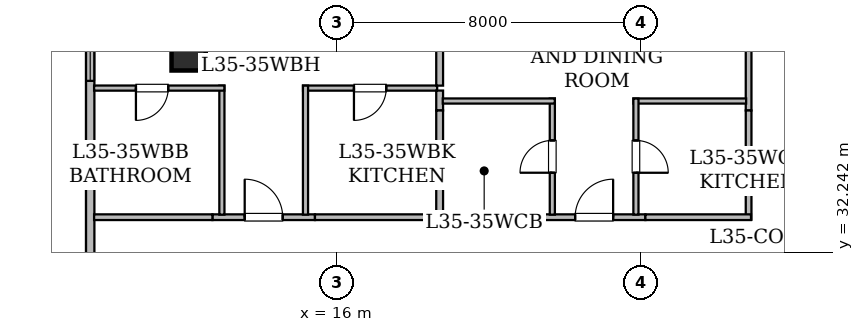
"""IFC4 building model, lengths in metres.
Left out: names, types, materials, properties, quantities, classifications, styles, units other than length and angle.
Written with IfcOpenShell. Run it as: python <this file> out.ifc"""

import sys

from ifc_helpers import new_model, si_unit, direction, frame, frame_2d, origin, origin_2d, place, context, subcontext, project, spatial, rectangle, hollow_rectangle, extrude, element, fill, save


model = new_model("IFC4")
c1 = context("Model", 3, precision=1e-05, world=origin(), true_north=direction((0.0, 1.0)))
c2 = subcontext(c1, "Body", "Model", "MODEL_VIEW")
j1 = project(units=[si_unit("LENGTHUNIT", "METRE"), si_unit("PLANEANGLEUNIT", "RADIAN")], contexts=[c1])
p1 = place(None, origin())
s1 = spatial("IfcSite", under=j1, at=p1, CompositionType="ELEMENT")
p2 = place(p1, origin())
s2 = spatial("IfcBuilding", under=s1, at=p2, CompositionType="ELEMENT")
p3 = place(p2, frame((0.0, 0.0, 138.4)))
s3 = spatial("IfcBuildingStorey", under=s2, at=p3, CompositionType="ELEMENT", Elevation=138.4)
p4 = place(p3, frame((12.1, 37.475, 0.0), z_axis=(0.0, 0.0, 1.0), x_axis=(1.0, 0.0, 0.0)))
e1 = element("IfcColumn", 1, at=p4, inside=s3, PredefinedType="COLUMN", context=c2, shape_type="SweptSolid", body=[
    extrude(hollow_rectangle(XDim=0.9, YDim=0.9, WallThickness=0.045, at=origin_2d()), origin(), (0.0, 0.0, 1.0), 3.65),
])
p5 = place(p3, frame((9.51, 31.293, 0.0), z_axis=(0.0, 0.0, 1.0), x_axis=(0.0, 1.0, 0.0)))
e2 = element("IfcWall", 2, at=p5, inside=s3, PredefinedType="STANDARD", context=c2, shape_type="SweptSolid", body=[
    extrude(rectangle(XDim=14.061, YDim=0.22, at=frame_2d((7.031, 0.0))), origin(), (0.0, 0.0, 1.0), 3.43),
])
p6 = place(p5, frame((5.459, 0.0, 0.8)))
e3 = element("IfcOpeningElement", 3, at=p6, cuts=e2, PredefinedType="OPENING", context=c2, shape_type="SweptSolid", body=[
    extrude(rectangle(XDim=1.2, YDim=1.5, at=frame_2d((0.6, 0.75))), frame((0.0, 0.12, 0.0), z_axis=(0.0, -1.0, 0.0), x_axis=(1.0, 0.0, 0.0)), (0.0, 0.0, 1.0), 0.24),
])
p7 = place(p5, frame((9.237, 0.0, 0.85)))
e4 = element("IfcOpeningElement", 4, at=p7, cuts=e2, PredefinedType="OPENING", context=c2, shape_type="SweptSolid", body=[
    extrude(rectangle(XDim=1.65, YDim=1.55, at=frame_2d((0.825, 0.775))), frame((0.0, 0.12, 0.0), z_axis=(0.0, -1.0, 0.0), x_axis=(1.0, 0.0, 0.0)), (0.0, 0.0, 1.0), 0.24),
])
p8 = place(p3, frame((12.726, 33.165, 0.0), z_axis=(0.0, 0.0, 1.0), x_axis=(1.0, 0.0, 0.0)))
e5 = element("IfcWall", 5, at=p8, inside=s3, PredefinedType="STANDARD", context=c2, shape_type="SweptSolid", body=[
    extrude(rectangle(XDim=2.698, YDim=0.15, at=frame_2d((1.349, 0.0))), origin(), (0.0, 0.0, 1.0), 3.43),
])
p9 = place(p8, frame((0.849, 0.0, 0.0)))
e6 = element("IfcOpeningElement", 6, at=p9, cuts=e5, PredefinedType="OPENING", context=c2, shape_type="SweptSolid", body=[
    extrude(rectangle(XDim=1.0, YDim=2.15, at=frame_2d((0.5, 1.075))), frame((0.0, 0.085, 0.0), z_axis=(0.0, -1.0, 0.0), x_axis=(1.0, 0.0, 0.0)), (0.0, 0.0, 1.0), 0.17),
])
p10 = place(p3, frame((9.612, 33.165, 0.0), z_axis=(0.0, 0.0, 1.0), x_axis=(1.0, 0.0, 0.0)))
e7 = element("IfcWall", 7, at=p10, inside=s3, PredefinedType="STANDARD", context=c2, shape_type="SweptSolid", body=[
    extrude(rectangle(XDim=3.114, YDim=0.15, at=frame_2d((1.557, 0.0))), origin(), (0.0, 0.0, 1.0), 2.876),
])
p11 = place(p3, frame((15.424, 33.165, 0.0), z_axis=(0.0, 0.0, 1.0), x_axis=(1.0, 0.0, 0.0)))
e8 = element("IfcWall", 8, at=p11, inside=s3, PredefinedType="STANDARD", context=c2, shape_type="SweptSolid", body=[
    extrude(rectangle(XDim=3.53, YDim=0.15, at=frame_2d((1.765, 0.0))), origin(), (0.0, 0.0, 1.0), 2.647),
])
p12 = place(p3, frame((26.835, 35.973, 0.0), z_axis=(0.0, 0.0, 1.0), x_axis=(0.0, 1.0, 0.0)))
e9 = element("IfcWall", 9, at=p12, inside=s3, PredefinedType="STANDARD", context=c2, shape_type="SweptSolid", body=[
    extrude(rectangle(XDim=2.078, YDim=0.15, at=frame_2d((1.039, 0.0))), origin(), (0.0, 0.0, 1.0), 2.647),
])
p13 = place(p3, frame((21.421, 33.165, 0.0), z_axis=(0.0, 0.0, 1.0), x_axis=(1.0, 0.0, 0.0)))
e10 = element("IfcWall", 10, at=p13, inside=s3, PredefinedType="STANDARD", context=c2, shape_type="SweptSolid", body=[
    extrude(rectangle(XDim=2.698, YDim=0.15, at=frame_2d((1.349, 0.0))), origin(), (0.0, 0.0, 1.0), 3.43),
])
p14 = place(p13, frame((0.849, 0.0, 0.0)))
e11 = element("IfcOpeningElement", 11, at=p14, cuts=e10, PredefinedType="OPENING", context=c2, shape_type="SweptSolid", body=[
    extrude(rectangle(XDim=1.0, YDim=2.15, at=frame_2d((0.5, 1.075))), frame((0.0, 0.085, 0.0), z_axis=(0.0, -1.0, 0.0), x_axis=(1.0, 0.0, 0.0)), (0.0, 0.0, 1.0), 0.17),
])
p15 = place(p3, frame((18.954, 33.165, 0.0), z_axis=(0.0, 0.0, 1.0), x_axis=(1.0, 0.0, 0.0)))
e12 = element("IfcWall", 12, at=p15, inside=s3, PredefinedType="STANDARD", context=c2, shape_type="SweptSolid", body=[
    extrude(rectangle(XDim=2.467, YDim=0.15, at=frame_2d((1.233, 0.0))), origin(), (0.0, 0.0, 1.0), 3.43),
])
p16 = place(p3, frame((26.835, 33.1, 0.0), z_axis=(0.0, 0.0, 1.0), x_axis=(0.0, 1.0, 0.0)))
e13 = element("IfcWall", 13, at=p16, inside=s3, PredefinedType="STANDARD", context=c2, shape_type="SweptSolid", body=[
    extrude(rectangle(XDim=2.873, YDim=0.15, at=frame_2d((1.437, 0.0))), origin(), (0.0, 0.0, 1.0), 3.43),
])
p17 = place(p3, frame((24.119, 33.165, 0.0), z_axis=(0.0, 0.0, 1.0), x_axis=(1.0, 0.0, 0.0)))
e14 = element("IfcWall", 14, at=p17, inside=s3, PredefinedType="STANDARD", context=c2, shape_type="SweptSolid", body=[
    extrude(rectangle(XDim=2.779, YDim=0.15, at=frame_2d((1.39, 0.0))), origin(), (0.0, 0.0, 1.0), 3.43),
])
p18 = place(p3, frame((12.975, 33.232, 0.0), z_axis=(0.0, 0.0, 1.0), x_axis=(0.0, 1.0, 0.0)))
e15 = element("IfcWall", 15, at=p18, inside=s3, PredefinedType="PARTITIONING", context=c2, shape_type="SweptSolid", body=[
    extrude(rectangle(XDim=3.395, YDim=0.135, at=frame_2d((1.698, 0.0))), origin(), (0.0, 0.0, 1.0), 3.43),
])
p19 = place(p3, frame((13.04, 36.562, 0.0), z_axis=(0.0, 0.0, 1.0), x_axis=(-1.0, 0.0, 0.0)))
e16 = element("IfcWall", 16, at=p19, inside=s3, PredefinedType="PARTITIONING", context=c2, shape_type="SweptSolid", body=[
    extrude(rectangle(XDim=3.428, YDim=0.135, at=frame_2d((1.714, 0.0))), origin(), (0.0, 0.0, 1.0), 2.876),
])
p20 = place(p19, frame((1.477, 0.0, 0.0)))
e17 = element("IfcOpeningElement", 17, at=p20, cuts=e16, PredefinedType="OPENING", context=c2, shape_type="SweptSolid", body=[
    extrude(rectangle(XDim=0.85, YDim=2.1, at=frame_2d((0.425, 1.05))), frame((0.0, 0.077, 0.0), z_axis=(0.0, -1.0, 0.0), x_axis=(1.0, 0.0, 0.0)), (0.0, 0.0, 1.0), 0.155),
])
p21 = place(p3, frame((18.64, 36.562, 0.0), z_axis=(0.0, 0.0, 1.0), x_axis=(-1.0, 0.0, 0.0)))
e18 = element("IfcWall", 18, at=p21, inside=s3, PredefinedType="PARTITIONING", context=c2, shape_type="SweptSolid", body=[
    extrude(rectangle(XDim=3.53, YDim=0.135, at=frame_2d((1.765, 0.0))), origin(), (0.0, 0.0, 1.0), 2.647),
])
p22 = place(p21, frame((1.34, 0.0, 0.0)))
e19 = element("IfcOpeningElement", 19, at=p22, cuts=e18, PredefinedType="OPENING", context=c2, shape_type="SweptSolid", body=[
    extrude(rectangle(XDim=0.85, YDim=2.1, at=frame_2d((0.425, 1.05))), frame((0.0, 0.077, 0.0), z_axis=(0.0, -1.0, 0.0), x_axis=(1.0, 0.0, 0.0)), (0.0, 0.0, 1.0), 0.155),
])
p23 = place(p3, frame((15.175, 36.627, 0.0), z_axis=(0.0, 0.0, 1.0), x_axis=(0.0, -1.0, 0.0)))
e20 = element("IfcWall", 20, at=p23, inside=s3, PredefinedType="PARTITIONING", context=c2, shape_type="SweptSolid", body=[
    extrude(rectangle(XDim=3.395, YDim=0.135, at=frame_2d((1.698, 0.0))), origin(), (0.0, 0.0, 1.0), 3.43),
])
p24 = place(p3, frame((18.705, 38.051, 0.0), z_axis=(0.0, 0.0, 1.0), x_axis=(0.0, -1.0, 0.0)))
e21 = element("IfcWall", 21, at=p24, inside=s3, PredefinedType="STANDARD", context=c2, shape_type="SweptSolid", body=[
    extrude(rectangle(XDim=1.424, YDim=0.18, at=frame_2d((0.712, 0.0))), origin(), (0.0, 0.0, 1.0), 2.647),
])
p25 = place(p3, frame((18.705, 36.497, 0.0), z_axis=(0.0, 0.0, 1.0), x_axis=(0.0, -1.0, 0.0)))
e22 = element("IfcWall", 22, at=p25, inside=s3, PredefinedType="STANDARD", context=c2, shape_type="SweptSolid", body=[
    extrude(rectangle(XDim=0.524, YDim=0.18, at=frame_2d((0.262, 0.0))), origin(), (0.0, 0.0, 1.0), 3.43),
])
p26 = place(p3, frame((18.705, 35.973, 0.0), z_axis=(0.0, 0.0, 1.0), x_axis=(0.0, -1.0, 0.0)))
e23 = element("IfcWall", 23, at=p26, inside=s3, PredefinedType="STANDARD", context=c2, shape_type="SweptSolid", body=[
    extrude(rectangle(XDim=2.741, YDim=0.18, at=frame_2d((1.371, 0.0))), origin(), (0.0, 0.0, 1.0), 3.43),
])
p27 = place(p3, frame((21.67, 33.232, 0.0), z_axis=(0.0, 0.0, 1.0), x_axis=(0.0, 1.0, 0.0)))
e24 = element("IfcWall", 24, at=p27, inside=s3, PredefinedType="PARTITIONING", context=c2, shape_type="SweptSolid", body=[
    extrude(rectangle(XDim=3.055, YDim=0.135, at=frame_2d((1.528, 0.0))), origin(), (0.0, 0.0, 1.0), 3.43),
])
p28 = place(p27, frame((1.103, 0.0, 0.0)))
e25 = element("IfcOpeningElement", 25, at=p28, cuts=e24, PredefinedType="OPENING", context=c2, shape_type="SweptSolid", body=[
    extrude(rectangle(XDim=0.85, YDim=2.1, at=frame_2d((0.425, 1.05))), frame((0.0, 0.077, 0.0), z_axis=(0.0, -1.0, 0.0), x_axis=(1.0, 0.0, 0.0)), (0.0, 0.0, 1.0), 0.155),
])
p29 = place(p3, frame((21.735, 36.222, 0.0), z_axis=(0.0, 0.0, 1.0), x_axis=(-1.0, 0.0, 0.0)))
e26 = element("IfcWall", 26, at=p29, inside=s3, PredefinedType="PARTITIONING", context=c2, shape_type="SweptSolid", body=[
    extrude(rectangle(XDim=2.948, YDim=0.135, at=frame_2d((1.474, 0.0))), origin(), (0.0, 0.0, 1.0), 3.43),
])
p30 = place(p3, frame((26.77, 36.222, 0.0), z_axis=(0.0, 0.0, 1.0), x_axis=(-1.0, 0.0, 0.0)))
e27 = element("IfcWall", 27, at=p30, inside=s3, PredefinedType="PARTITIONING", context=c2, shape_type="SweptSolid", body=[
    extrude(rectangle(XDim=2.965, YDim=0.135, at=frame_2d((1.482, 0.0))), origin(), (0.0, 0.0, 1.0), 3.43),
])
p31 = place(p3, frame((23.87, 36.287, 0.0), z_axis=(0.0, 0.0, 1.0), x_axis=(0.0, -1.0, 0.0)))
e28 = element("IfcWall", 28, at=p31, inside=s3, PredefinedType="PARTITIONING", context=c2, shape_type="SweptSolid", body=[
    extrude(rectangle(XDim=3.055, YDim=0.135, at=frame_2d((1.528, 0.0))), origin(), (0.0, 0.0, 1.0), 3.43),
])
p32 = place(p31, frame((1.103, 0.0, 0.0)))
e29 = element("IfcOpeningElement", 29, at=p32, cuts=e28, PredefinedType="OPENING", context=c2, shape_type="SweptSolid", body=[
    extrude(rectangle(XDim=0.85, YDim=2.1, at=frame_2d((0.425, 1.05))), frame((0.0, 0.077, 0.0), z_axis=(0.0, -1.0, 0.0), x_axis=(1.0, 0.0, 0.0)), (0.0, 0.0, 1.0), 0.155),
])
p33 = place(p6, origin())
e30 = element("IfcWindow", 30, at=p33, inside=s3, PartitioningType="SINGLE_PANEL", PredefinedType="WINDOW", context=c2, shape_type="SweptSolid", body=[
    extrude(rectangle(XDim=1.2, YDim=1.5, at=frame_2d((0.6, 0.75))), frame((0.0, 0.03, 0.0), z_axis=(0.0, -1.0, 0.0), x_axis=(1.0, 0.0, 0.0)), (0.0, 0.0, 1.0), 0.06),
])
fill(e3, e30)
p34 = place(p9, origin())
e31 = element("IfcDoor", 31, at=p34, inside=s3, OperationType="SINGLE_SWING_LEFT", PredefinedType="DOOR", context=c2, shape_type="SweptSolid", body=[
    extrude(rectangle(XDim=1.0, YDim=2.15, at=frame_2d((0.5, 1.075))), frame((0.0, 0.025, 0.0), z_axis=(0.0, -1.0, 0.0), x_axis=(1.0, 0.0, 0.0)), (0.0, 0.0, 1.0), 0.05),
])
fill(e6, e31)
p35 = place(p14, origin())
e32 = element("IfcDoor", 32, at=p35, inside=s3, OperationType="SINGLE_SWING_RIGHT", PredefinedType="DOOR", context=c2, shape_type="SweptSolid", body=[
    extrude(rectangle(XDim=1.0, YDim=2.15, at=frame_2d((0.5, 1.075))), frame((0.0, 0.025, 0.0), z_axis=(0.0, -1.0, 0.0), x_axis=(1.0, 0.0, 0.0)), (0.0, 0.0, 1.0), 0.05),
])
fill(e11, e32)
p36 = place(p20, origin())
e33 = element("IfcDoor", 33, at=p36, inside=s3, OperationType="SINGLE_SWING_RIGHT", PredefinedType="DOOR", context=c2, shape_type="SweptSolid", body=[
    extrude(rectangle(XDim=0.85, YDim=2.1, at=frame_2d((0.425, 1.05))), frame((0.0, 0.025, 0.0), z_axis=(0.0, -1.0, 0.0), x_axis=(1.0, 0.0, 0.0)), (0.0, 0.0, 1.0), 0.05),
])
fill(e17, e33)
p37 = place(p22, origin())
e34 = element("IfcDoor", 34, at=p37, inside=s3, OperationType="SINGLE_SWING_RIGHT", PredefinedType="DOOR", context=c2, shape_type="SweptSolid", body=[
    extrude(rectangle(XDim=0.85, YDim=2.1, at=frame_2d((0.425, 1.05))), frame((0.0, 0.025, 0.0), z_axis=(0.0, -1.0, 0.0), x_axis=(1.0, 0.0, 0.0)), (0.0, 0.0, 1.0), 0.05),
])
fill(e19, e34)
p38 = place(p28, origin())
e35 = element("IfcDoor", 35, at=p38, inside=s3, OperationType="SINGLE_SWING_LEFT", PredefinedType="DOOR", context=c2, shape_type="SweptSolid", body=[
    extrude(rectangle(XDim=0.85, YDim=2.1, at=frame_2d((0.425, 1.05))), frame((0.0, 0.025, 0.0), z_axis=(0.0, -1.0, 0.0), x_axis=(1.0, 0.0, 0.0)), (0.0, 0.0, 1.0), 0.05),
])
fill(e25, e35)
p39 = place(p32, origin())
e36 = element("IfcDoor", 36, at=p39, inside=s3, OperationType="SINGLE_SWING_RIGHT", PredefinedType="DOOR", context=c2, shape_type="SweptSolid", body=[
    extrude(rectangle(XDim=0.85, YDim=2.1, at=frame_2d((0.425, 1.05))), frame((0.0, 0.025, 0.0), z_axis=(0.0, -1.0, 0.0), x_axis=(1.0, 0.0, 0.0)), (0.0, 0.0, 1.0), 0.05),
])
fill(e29, e36)
save(model, sys.argv[1])
